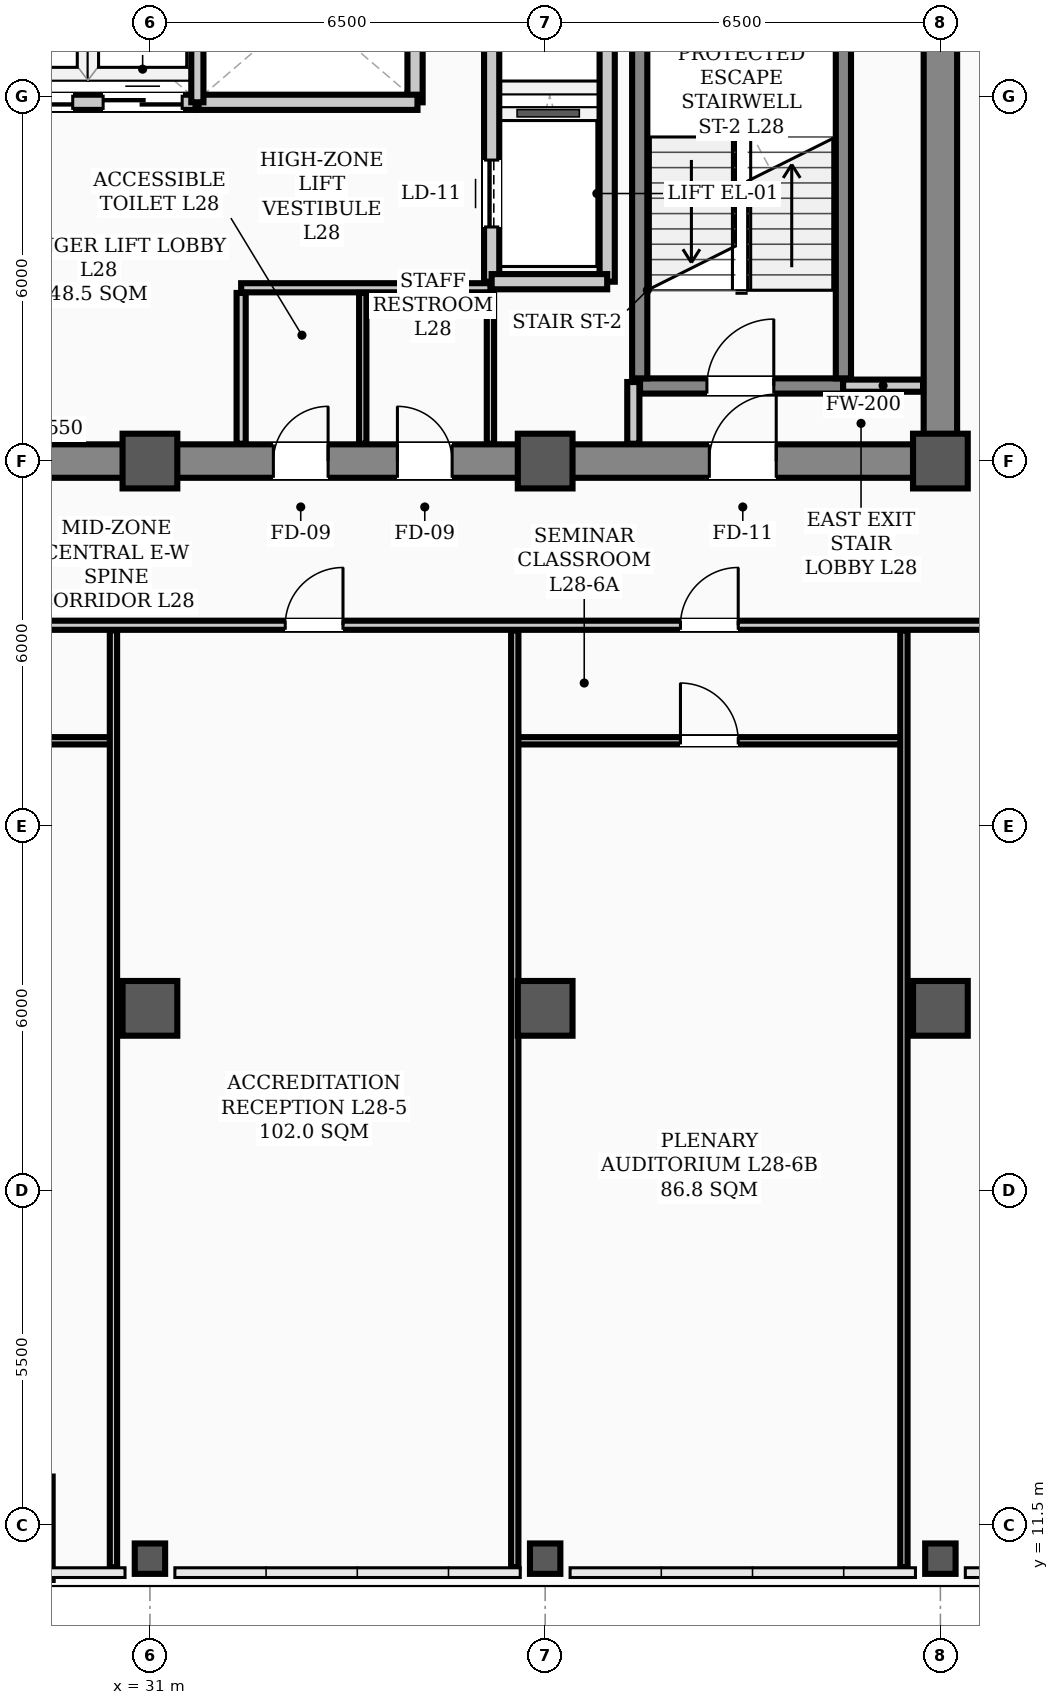
"""IFC4 building model, lengths in metres.
Left out: names, types, materials, properties, quantities, classifications, styles, units other than length and angle.
Written with IfcOpenShell. Run it as: python <this file> out.ifc"""

import sys

from ifc_helpers import new_model, si_unit, direction, frame, frame_2d, origin, origin_2d, place, context, subcontext, project, spatial, rectangle, hollow_rectangle, extrude, element, fill, save


model = new_model("IFC4")
c1 = context("Model", 3, precision=1e-05, world=origin(), true_north=direction((0.0, 1.0)))
c2 = subcontext(c1, "Body", "Model", "MODEL_VIEW")
j1 = project(units=[si_unit("LENGTHUNIT", "METRE"), si_unit("PLANEANGLEUNIT", "RADIAN")], contexts=[c1])
p1 = place(None, origin())
s1 = spatial("IfcSite", under=j1, at=p1, CompositionType="ELEMENT")
p2 = place(p1, origin())
s2 = spatial("IfcBuilding", under=s1, at=p2, CompositionType="ELEMENT")
p3 = place(p2, frame((0.0, 0.0, 114.9)))
s3 = spatial("IfcBuildingStorey", under=s2, at=p3, CompositionType="ELEMENT", Elevation=114.9)
for number, where, z_axis, x_axis in (
    (1, (31.0, 29.0, 0.0), (0.0, 0.0, 1.0), (1.0, 0.0, 0.0)),
    (2, (37.5, 29.0, 0.0), (0.0, 0.0, 1.0), (1.0, 0.0, 0.0)),
    (3, (44.0, 29.0, 0.0), (0.0, 0.0, 1.0), (1.0, 0.0, 0.0)),
    (4, (31.0, 20.0, 0.0), (0.0, 0.0, 1.0), (1.0, 0.0, 0.0)),
    (5, (37.5, 20.0, 0.0), (0.0, 0.0, 1.0), (1.0, 0.0, 0.0)),
    (6, (44.0, 20.0, 0.0), (0.0, 0.0, 1.0), (1.0, 0.0, 0.0)),
):
    element("IfcColumn", number, at=place(p3, frame(where, z_axis=z_axis, x_axis=x_axis)), inside=s3, PredefinedType="COLUMN", context=c2, shape_type="SweptSolid", body=[
        extrude(hollow_rectangle(XDim=0.9, YDim=0.9, WallThickness=0.035, InnerFilletRadius=0.017, OuterFilletRadius=0.052, at=origin_2d()), origin(), (0.0, 0.0, 1.0), 3.9),
    ])
for number, where, z_axis, x_axis in (
    (7, (31.0, 10.95, 0.0), (0.0, 0.0, 1.0), (1.0, 0.0, 0.0)),
    (8, (37.5, 10.95, 0.0), (0.0, 0.0, 1.0), (1.0, 0.0, 0.0)),
    (9, (44.0, 10.95, 0.0), (0.0, 0.0, 1.0), (1.0, 0.0, 0.0)),
):
    element("IfcColumn", number, at=place(p3, frame(where, z_axis=z_axis, x_axis=x_axis)), inside=s3, PredefinedType="COLUMN", context=c2, shape_type="SweptSolid", body=[
        extrude(hollow_rectangle(XDim=0.5, YDim=0.5, WallThickness=0.024, InnerFilletRadius=0.012, OuterFilletRadius=0.036, at=origin_2d()), origin(), (0.0, 0.0, 1.0), 3.9),
    ])
p4 = place(p3, frame((29.3, 12.3, 0.0), z_axis=(0.0, 0.0, 1.0), x_axis=(0.0, -1.0, 0.0)))
e10 = element("IfcWall", 10, at=p4, inside=s3, PredefinedType="PARAPET", context=c2, shape_type="SweptSolid", body=[
    extrude(rectangle(XDim=1.7, YDim=0.2, at=frame_2d((0.85, 0.0))), origin(), (0.0, 0.0, 1.0), 1.2),
])
p5 = place(p3, frame((13.5, 29.0, 0.0), z_axis=(0.0, 0.0, 1.0), x_axis=(1.0, 0.0, 0.0)))
e11 = element("IfcWall", 11, at=p5, inside=s3, PredefinedType="SHEAR", context=c2, shape_type="SweptSolid", body=[
    extrude(rectangle(XDim=30.5, YDim=0.55, at=frame_2d((15.25, 0.0))), origin(), (0.0, 0.0, 1.0), 3.72),
])
p6 = place(p5, frame((1.75, 0.0, 0.0)))
e12 = element("IfcOpeningElement", 12, at=p6, cuts=e11, PredefinedType="OPENING", context=c2, shape_type="SweptSolid", body=[
    extrude(rectangle(XDim=1.1, YDim=2.08, at=frame_2d((0.55, 1.04))), frame((0.0, 0.285, 0.0), z_axis=(0.0, -1.0, 0.0), x_axis=(1.0, 0.0, 0.0)), (0.0, 0.0, 1.0), 0.57),
])
p7 = place(p5, frame((26.7, 0.0, 0.0)))
e13 = element("IfcOpeningElement", 13, at=p7, cuts=e11, PredefinedType="OPENING", context=c2, shape_type="SweptSolid", body=[
    extrude(rectangle(XDim=1.1, YDim=2.08, at=frame_2d((0.55, 1.04))), frame((0.0, 0.285, 0.0), z_axis=(0.0, -1.0, 0.0), x_axis=(1.0, 0.0, 0.0)), (0.0, 0.0, 1.0), 0.57),
])
p8 = place(p5, frame((6.8, 0.0, 0.0)))
e14 = element("IfcOpeningElement", 14, at=p8, cuts=e11, PredefinedType="OPENING", context=c2, shape_type="SweptSolid", body=[
    extrude(rectangle(XDim=1.1, YDim=2.08, at=frame_2d((0.55, 1.04))), frame((0.0, 0.285, 0.0), z_axis=(0.0, -1.0, 0.0), x_axis=(1.0, 0.0, 0.0)), (0.0, 0.0, 1.0), 0.57),
])
p9 = place(p5, frame((13.2, 0.0, 0.0)))
e15 = element("IfcOpeningElement", 15, at=p9, cuts=e11, PredefinedType="OPENING", context=c2, shape_type="SweptSolid", body=[
    extrude(rectangle(XDim=1.6, YDim=2.08, at=frame_2d((0.8, 1.04))), frame((0.0, 0.285, 0.0), z_axis=(0.0, -1.0, 0.0), x_axis=(1.0, 0.0, 0.0)), (0.0, 0.0, 1.0), 0.57),
])
p10 = place(p5, frame((19.53, 0.0, 0.0)))
e16 = element("IfcOpeningElement", 16, at=p10, cuts=e11, PredefinedType="OPENING", context=c2, shape_type="SweptSolid", body=[
    extrude(rectangle(XDim=0.9, YDim=2.08, at=frame_2d((0.45, 1.04))), frame((0.0, 0.285, 0.0), z_axis=(0.0, -1.0, 0.0), x_axis=(1.0, 0.0, 0.0)), (0.0, 0.0, 1.0), 0.57),
])
p11 = place(p5, frame((21.57, 0.0, 0.0)))
e17 = element("IfcOpeningElement", 17, at=p11, cuts=e11, PredefinedType="OPENING", context=c2, shape_type="SweptSolid", body=[
    extrude(rectangle(XDim=0.9, YDim=2.08, at=frame_2d((0.45, 1.04))), frame((0.0, 0.285, 0.0), z_axis=(0.0, -1.0, 0.0), x_axis=(1.0, 0.0, 0.0)), (0.0, 0.0, 1.0), 0.57),
])
p12 = place(p3, frame((44.0, 29.35, 0.0), z_axis=(0.0, 0.0, 1.0), x_axis=(0.0, 1.0, 0.0)))
e18 = element("IfcWall", 18, at=p12, inside=s3, PredefinedType="SHEAR", context=c2, shape_type="SweptSolid", body=[
    extrude(rectangle(XDim=8.6, YDim=0.55, at=frame_2d((4.3, 0.0))), origin(), (0.0, 0.0, 1.0), 3.72),
])
p13 = place(p3, frame((39.06, 30.235, 0.0), z_axis=(0.0, 0.0, 1.0), x_axis=(1.0, 0.0, 0.0)))
e19 = element("IfcWall", 19, at=p13, inside=s3, PredefinedType="STANDARD", context=c2, shape_type="SweptSolid", body=[
    extrude(rectangle(XDim=3.34, YDim=0.25, at=frame_2d((1.67, 0.0))), origin(), (0.0, 0.0, 1.0), 3.72),
])
p14 = place(p13, frame((1.1, 0.0, 0.0)))
e20 = element("IfcOpeningElement", 20, at=p14, cuts=e19, PredefinedType="OPENING", context=c2, shape_type="SweptSolid", body=[
    extrude(rectangle(XDim=1.1, YDim=2.08, at=frame_2d((0.55, 1.04))), frame((0.0, 0.135, 0.0), z_axis=(0.0, -1.0, 0.0), x_axis=(1.0, 0.0, 0.0)), (0.0, 0.0, 1.0), 0.27),
])
for number, where, z_axis, x_axis in (
    (21, (39.055, 30.36, 0.0), (0.0, 0.0, 1.0), (0.0, 1.0, 0.0)),
    (22, (42.405, 30.36, 0.0), (0.0, 0.0, 1.0), (0.0, 1.0, 0.0)),
):
    element("IfcWall", number, at=place(p3, frame(where, z_axis=z_axis, x_axis=x_axis)), inside=s3, PredefinedType="STANDARD", context=c2, shape_type="SweptSolid", body=[
        extrude(rectangle(XDim=7.184, YDim=0.25, at=frame_2d((3.592, 0.0))), origin(), (0.0, 0.0, 1.0), 3.72),
    ])
p15 = place(p3, frame((36.62, 31.95, 0.0), z_axis=(0.0, 0.0, 1.0), x_axis=(0.0, 1.0, 0.0)))
e23 = element("IfcWall", 23, at=p15, inside=s3, PredefinedType="STANDARD", context=c2, shape_type="SweptSolid", body=[
    extrude(rectangle(XDim=6.0, YDim=0.25, at=frame_2d((3.0, 0.0))), origin(), (0.0, 0.0, 1.0), 3.72),
])
p16 = place(p15, frame((0.9, 0.0, 0.0)))
e24 = element("IfcOpeningElement", 24, at=p16, cuts=e23, PredefinedType="OPENING", context=c2, shape_type="SweptSolid", body=[
    extrude(rectangle(XDim=1.1, YDim=2.08, at=frame_2d((0.55, 1.04))), frame((0.0, 0.135, 0.0), z_axis=(0.0, -1.0, 0.0), x_axis=(1.0, 0.0, 0.0)), (0.0, 0.0, 1.0), 0.27),
])
p17 = place(p15, frame((4.0, 0.0, 0.0)))
e25 = element("IfcOpeningElement", 25, at=p17, cuts=e23, PredefinedType="OPENING", context=c2, shape_type="SweptSolid", body=[
    extrude(rectangle(XDim=1.1, YDim=2.08, at=frame_2d((0.55, 1.04))), frame((0.0, 0.135, 0.0), z_axis=(0.0, -1.0, 0.0), x_axis=(1.0, 0.0, 0.0)), (0.0, 0.0, 1.0), 0.27),
])
p18 = place(p3, frame((38.52, 31.95, 0.0), z_axis=(0.0, 0.0, 1.0), x_axis=(0.0, 1.0, 0.0)))
e26 = element("IfcWall", 26, at=p18, inside=s3, PredefinedType="STANDARD", context=c2, shape_type="SweptSolid", body=[
    extrude(rectangle(XDim=6.0, YDim=0.25, at=frame_2d((3.0, 0.0))), origin(), (0.0, 0.0, 1.0), 3.48),
])
p19 = place(p3, frame((36.62, 31.95, 0.0), z_axis=(0.0, 0.0, 1.0), x_axis=(1.0, 0.0, 0.0)))
e27 = element("IfcWall", 27, at=p19, inside=s3, PredefinedType="STANDARD", context=c2, shape_type="SweptSolid", body=[
    extrude(rectangle(XDim=1.9, YDim=0.25, at=frame_2d((0.95, 0.0))), origin(), (0.0, 0.0, 1.0), 3.48),
])
p20 = place(p3, frame((35.36, 34.9, 0.0), z_axis=(0.0, 0.0, 1.0), x_axis=(0.0, 1.0, 0.0)))
e28 = element("IfcWall", 28, at=p20, inside=s3, PredefinedType="STANDARD", context=c2, shape_type="SweptSolid", body=[
    extrude(rectangle(XDim=3.05, YDim=0.25, at=frame_2d((1.525, 0.0))), origin(), (0.0, 0.0, 1.0), 3.72),
])
p21 = place(p3, frame((28.2, 34.9, 0.0), z_axis=(0.0, 0.0, 1.0), x_axis=(1.0, 0.0, 0.0)))
e29 = element("IfcWall", 29, at=p21, inside=s3, PredefinedType="STANDARD", context=c2, shape_type="SweptSolid", body=[
    extrude(rectangle(XDim=3.55, YDim=0.25, at=frame_2d((1.775, 0.0))), origin(), (0.0, 0.0, 1.0), 3.72),
])
p22 = place(p21, frame((0.23, 0.0, 0.0)))
e30 = element("IfcOpeningElement", 30, at=p22, cuts=e29, PredefinedType="OPENING", context=c2, shape_type="SweptSolid", body=[
    extrude(rectangle(XDim=1.3, YDim=2.08, at=frame_2d((0.65, 1.04))), frame((0.0, 0.135, 0.0), z_axis=(0.0, -1.0, 0.0), x_axis=(1.0, 0.0, 0.0)), (0.0, 0.0, 1.0), 0.27),
])
p23 = place(p21, frame((2.03, 0.0, 0.0)))
e31 = element("IfcOpeningElement", 31, at=p23, cuts=e29, PredefinedType="OPENING", context=c2, shape_type="SweptSolid", body=[
    extrude(rectangle(XDim=1.3, YDim=2.08, at=frame_2d((0.65, 1.04))), frame((0.0, 0.135, 0.0), z_axis=(0.0, -1.0, 0.0), x_axis=(1.0, 0.0, 0.0)), (0.0, 0.0, 1.0), 0.27),
])
p24 = place(p3, frame((31.8, 34.9, 0.0), z_axis=(0.0, 0.0, 1.0), x_axis=(1.0, 0.0, 0.0)))
e32 = element("IfcWall", 32, at=p24, inside=s3, PredefinedType="STANDARD", context=c2, shape_type="SweptSolid", body=[
    extrude(rectangle(XDim=3.6, YDim=0.25, at=frame_2d((1.8, 0.0))), origin(), (0.0, 0.0, 1.0), 3.72),
])
p25 = place(p3, frame((42.4, 30.24, 0.0), z_axis=(0.0, 0.0, 1.0), x_axis=(1.0, 0.0, 0.0)))
e33 = element("IfcWall", 33, at=p25, inside=s3, PredefinedType="STANDARD", context=c2, shape_type="SweptSolid", body=[
    extrude(rectangle(XDim=1.315, YDim=0.2, at=frame_2d((0.658, 0.0))), origin(), (0.0, 0.0, 1.0), 3.1),
])
p26 = place(p3, frame((32.5, 31.85, 0.0), z_axis=(0.0, 0.0, 1.0), x_axis=(1.0, 0.0, 0.0)))
e34 = element("IfcWall", 34, at=p26, inside=s3, PredefinedType="PARTITIONING", context=c2, shape_type="SweptSolid", body=[
    extrude(rectangle(XDim=4.1, YDim=0.15, at=frame_2d((2.05, 0.0))), origin(), (0.0, 0.0, 1.0), 3.72),
])
p27 = place(p3, frame((2.31, 26.3, 0.0), z_axis=(0.0, 0.0, 1.0), x_axis=(1.0, 0.0, 0.0)))
e35 = element("IfcWall", 35, at=p27, inside=s3, PredefinedType="PARTITIONING", context=c2, shape_type="SweptSolid", body=[
    extrude(rectangle(XDim=46.38, YDim=0.15, at=frame_2d((23.19, 0.0))), origin(), (0.0, 0.0, 1.0), 3.1),
])
p28 = place(p27, frame((12.415, 0.0, 0.0)))
e36 = element("IfcOpeningElement", 36, at=p28, cuts=e35, PredefinedType="OPENING", context=c2, shape_type="SweptSolid", body=[
    extrude(rectangle(XDim=0.95, YDim=2.08, at=frame_2d((0.475, 1.04))), frame((0.0, 0.085, 0.0), z_axis=(0.0, -1.0, 0.0), x_axis=(1.0, 0.0, 0.0)), (0.0, 0.0, 1.0), 0.17),
])
p29 = place(p27, frame((17.815, 0.0, 0.0)))
e37 = element("IfcOpeningElement", 37, at=p29, cuts=e35, PredefinedType="OPENING", context=c2, shape_type="SweptSolid", body=[
    extrude(rectangle(XDim=0.95, YDim=2.08, at=frame_2d((0.475, 1.04))), frame((0.0, 0.085, 0.0), z_axis=(0.0, -1.0, 0.0), x_axis=(1.0, 0.0, 0.0)), (0.0, 0.0, 1.0), 0.17),
])
p30 = place(p27, frame((24.315, 0.0, 0.0)))
e38 = element("IfcOpeningElement", 38, at=p30, cuts=e35, PredefinedType="OPENING", context=c2, shape_type="SweptSolid", body=[
    extrude(rectangle(XDim=0.95, YDim=2.08, at=frame_2d((0.475, 1.04))), frame((0.0, 0.085, 0.0), z_axis=(0.0, -1.0, 0.0), x_axis=(1.0, 0.0, 0.0)), (0.0, 0.0, 1.0), 0.17),
])
p31 = place(p27, frame((30.915, 0.0, 0.0)))
e39 = element("IfcOpeningElement", 39, at=p31, cuts=e35, PredefinedType="OPENING", context=c2, shape_type="SweptSolid", body=[
    extrude(rectangle(XDim=0.95, YDim=2.08, at=frame_2d((0.475, 1.04))), frame((0.0, 0.085, 0.0), z_axis=(0.0, -1.0, 0.0), x_axis=(1.0, 0.0, 0.0)), (0.0, 0.0, 1.0), 0.17),
])
p32 = place(p27, frame((37.415, 0.0, 0.0)))
e40 = element("IfcOpeningElement", 40, at=p32, cuts=e35, PredefinedType="OPENING", context=c2, shape_type="SweptSolid", body=[
    extrude(rectangle(XDim=0.95, YDim=2.08, at=frame_2d((0.475, 1.04))), frame((0.0, 0.085, 0.0), z_axis=(0.0, -1.0, 0.0), x_axis=(1.0, 0.0, 0.0)), (0.0, 0.0, 1.0), 0.17),
])
p33 = place(p27, frame((43.26, 0.0, 0.0)))
e41 = element("IfcOpeningElement", 41, at=p33, cuts=e35, PredefinedType="OPENING", context=c2, shape_type="SweptSolid", body=[
    extrude(rectangle(XDim=0.95, YDim=2.08, at=frame_2d((0.475, 1.04))), frame((0.0, 0.085, 0.0), z_axis=(0.0, -1.0, 0.0), x_axis=(1.0, 0.0, 0.0)), (0.0, 0.0, 1.0), 0.17),
])
p34 = place(p3, frame((23.8, 24.4, 0.0), z_axis=(0.0, 0.0, 1.0), x_axis=(1.0, 0.0, 0.0)))
e42 = element("IfcWall", 42, at=p34, inside=s3, PredefinedType="PARTITIONING", context=c2, shape_type="SweptSolid", body=[
    extrude(rectangle(XDim=6.6, YDim=0.12, at=frame_2d((3.3, 0.0))), origin(), (0.0, 0.0, 1.0), 3.1),
])
p35 = place(p34, frame((2.825, 0.0, 0.0)))
e43 = element("IfcOpeningElement", 43, at=p35, cuts=e42, PredefinedType="OPENING", context=c2, shape_type="SweptSolid", body=[
    extrude(rectangle(XDim=0.95, YDim=2.08, at=frame_2d((0.475, 1.04))), frame((0.0, 0.07, 0.0), z_axis=(0.0, -1.0, 0.0), x_axis=(1.0, 0.0, 0.0)), (0.0, 0.0, 1.0), 0.14),
])
p36 = place(p3, frame((37.0, 24.4, 0.0), z_axis=(0.0, 0.0, 1.0), x_axis=(1.0, 0.0, 0.0)))
e44 = element("IfcWall", 44, at=p36, inside=s3, PredefinedType="PARTITIONING", context=c2, shape_type="SweptSolid", body=[
    extrude(rectangle(XDim=6.4, YDim=0.12, at=frame_2d((3.2, 0.0))), origin(), (0.0, 0.0, 1.0), 3.1),
])
p37 = place(p36, frame((2.725, 0.0, 0.0)))
e45 = element("IfcOpeningElement", 45, at=p37, cuts=e44, PredefinedType="OPENING", context=c2, shape_type="SweptSolid", body=[
    extrude(rectangle(XDim=0.95, YDim=2.08, at=frame_2d((0.475, 1.04))), frame((0.0, 0.07, 0.0), z_axis=(0.0, -1.0, 0.0), x_axis=(1.0, 0.0, 0.0)), (0.0, 0.0, 1.0), 0.14),
])
p38 = place(p3, frame((38.95, 29.285, 0.0), z_axis=(0.0, 0.0, 1.0), x_axis=(0.0, 1.0, 0.0)))
e46 = element("IfcWall", 46, at=p38, inside=s3, PredefinedType="STANDARD", context=c2, shape_type="SweptSolid", body=[
    extrude(rectangle(XDim=1.015, YDim=0.2, at=frame_2d((0.508, 0.0))), origin(), (0.0, 0.0, 1.0), 3.3),
])
p39 = place(p3, frame((32.5, 29.285, 0.0), z_axis=(0.0, 0.0, 1.0), x_axis=(0.0, 1.0, 0.0)))
e47 = element("IfcWall", 47, at=p39, inside=s3, PredefinedType="PARTITIONING", context=c2, shape_type="SweptSolid", body=[
    extrude(rectangle(XDim=2.48, YDim=0.15, at=frame_2d((1.24, 0.0))), origin(), (0.0, 0.0, 1.0), 3.3),
])
for number, where, z_axis, x_axis in (
    (48, (36.6, 29.285, 0.0), (0.0, 0.0, 1.0), (0.0, 1.0, 0.0)),
    (49, (34.5, 29.285, 0.0), (0.0, 0.0, 1.0), (0.0, 1.0, 0.0)),
):
    element("IfcWall", number, at=place(p3, frame(where, z_axis=z_axis, x_axis=x_axis)), inside=s3, PredefinedType="PARTITIONING", context=c2, shape_type="SweptSolid", body=[
        extrude(rectangle(XDim=2.48, YDim=0.12, at=frame_2d((1.24, 0.0))), origin(), (0.0, 0.0, 1.0), 3.3),
    ])
for number, where, z_axis, x_axis in (
    (50, (30.4, 10.81, 0.0), (0.0, 0.0, 1.0), (0.0, 1.0, 0.0)),
    (51, (37.0, 10.81, 0.0), (0.0, 0.0, 1.0), (0.0, 1.0, 0.0)),
    (52, (43.4, 10.81, 0.0), (0.0, 0.0, 1.0), (0.0, 1.0, 0.0)),
):
    element("IfcWall", number, at=place(p3, frame(where, z_axis=z_axis, x_axis=x_axis)), inside=s3, PredefinedType="PARTITIONING", context=c2, shape_type="SweptSolid", body=[
        extrude(rectangle(XDim=15.405, YDim=0.12, at=frame_2d((7.703, 0.0))), origin(), (0.0, 0.0, 1.0), 3.0),
    ])
p40 = place(p3, frame((31.78, 34.9, 0.0), z_axis=(0.0, 0.0, 1.0), x_axis=(0.0, 1.0, 0.0)))
e53 = element("IfcWall", 53, at=p40, inside=s3, PredefinedType="STANDARD", context=c2, shape_type="SweptSolid", body=[
    extrude(rectangle(XDim=3.12, YDim=0.2, at=frame_2d((1.56, 0.0))), origin(), (0.0, 0.0, 1.0), 3.72),
])
p41 = place(p14, origin())
e54 = element("IfcDoor", 54, at=p41, inside=s3, OperationType="SINGLE_SWING_RIGHT", PredefinedType="DOOR", context=c2, shape_type="SweptSolid", body=[
    extrude(rectangle(XDim=1.1, YDim=2.08, at=frame_2d((0.55, 1.04))), frame((0.0, 0.025, 0.0), z_axis=(0.0, -1.0, 0.0), x_axis=(1.0, 0.0, 0.0)), (0.0, 0.0, 1.0), 0.05),
])
fill(e20, e54)
p42 = place(p7, origin())
e55 = element("IfcDoor", 55, at=p42, inside=s3, OperationType="SINGLE_SWING_RIGHT", PredefinedType="DOOR", context=c2, shape_type="SweptSolid", body=[
    extrude(rectangle(XDim=1.1, YDim=2.08, at=frame_2d((0.55, 1.04))), frame((0.0, 0.025, 0.0), z_axis=(0.0, -1.0, 0.0), x_axis=(1.0, 0.0, 0.0)), (0.0, 0.0, 1.0), 0.05),
])
fill(e13, e55)
p43 = place(p10, origin())
e56 = element("IfcDoor", 56, at=p43, inside=s3, OperationType="SINGLE_SWING_RIGHT", PredefinedType="DOOR", context=c2, shape_type="SweptSolid", body=[
    extrude(rectangle(XDim=0.9, YDim=2.08, at=frame_2d((0.45, 1.04))), frame((0.0, 0.025, 0.0), z_axis=(0.0, -1.0, 0.0), x_axis=(1.0, 0.0, 0.0)), (0.0, 0.0, 1.0), 0.05),
])
fill(e16, e56)
p44 = place(p11, origin())
e57 = element("IfcDoor", 57, at=p44, inside=s3, OperationType="SINGLE_SWING_LEFT", PredefinedType="DOOR", context=c2, shape_type="SweptSolid", body=[
    extrude(rectangle(XDim=0.9, YDim=2.08, at=frame_2d((0.45, 1.04))), frame((0.0, 0.025, 0.0), z_axis=(0.0, -1.0, 0.0), x_axis=(1.0, 0.0, 0.0)), (0.0, 0.0, 1.0), 0.05),
])
fill(e17, e57)
p45 = place(p31, origin())
e58 = element("IfcDoor", 58, at=p45, inside=s3, OperationType="SINGLE_SWING_RIGHT", PredefinedType="DOOR", context=c2, shape_type="SweptSolid", body=[
    extrude(rectangle(XDim=0.95, YDim=2.08, at=frame_2d((0.475, 1.04))), frame((0.0, 0.025, 0.0), z_axis=(0.0, -1.0, 0.0), x_axis=(1.0, 0.0, 0.0)), (0.0, 0.0, 1.0), 0.05),
])
fill(e39, e58)
p46 = place(p37, origin())
e59 = element("IfcDoor", 59, at=p46, inside=s3, OperationType="SINGLE_SWING_LEFT", PredefinedType="DOOR", context=c2, shape_type="SweptSolid", body=[
    extrude(rectangle(XDim=0.95, YDim=2.08, at=frame_2d((0.475, 1.04))), frame((0.0, 0.025, 0.0), z_axis=(0.0, -1.0, 0.0), x_axis=(1.0, 0.0, 0.0)), (0.0, 0.0, 1.0), 0.05),
])
fill(e45, e59)
p47 = place(p32, origin())
e60 = element("IfcDoor", 60, at=p47, inside=s3, OperationType="SINGLE_SWING_RIGHT", PredefinedType="DOOR", context=c2, shape_type="SweptSolid", body=[
    extrude(rectangle(XDim=0.95, YDim=2.08, at=frame_2d((0.475, 1.04))), frame((0.0, 0.025, 0.0), z_axis=(0.0, -1.0, 0.0), x_axis=(1.0, 0.0, 0.0)), (0.0, 0.0, 1.0), 0.05),
])
fill(e40, e60)
p48 = place(p16, origin())
e61 = element("IfcDoor", 61, at=p48, inside=s3, OperationType="SLIDING_TO_LEFT", PredefinedType="DOOR", context=c2, shape_type="SweptSolid", body=[
    extrude(rectangle(XDim=1.1, YDim=2.08, at=frame_2d((0.55, 1.04))), frame((0.0, 0.025, 0.0), z_axis=(0.0, -1.0, 0.0), x_axis=(1.0, 0.0, 0.0)), (0.0, 0.0, 1.0), 0.05),
])
fill(e24, e61)
p49 = place(p22, origin())
e62 = element("IfcDoor", 62, at=p49, inside=s3, OperationType="DOUBLE_DOOR_SLIDING", PredefinedType="DOOR", context=c2, shape_type="SweptSolid", body=[
    extrude(rectangle(XDim=1.3, YDim=2.08, at=frame_2d((0.65, 1.04))), frame((0.0, 0.025, 0.0), z_axis=(0.0, -1.0, 0.0), x_axis=(1.0, 0.0, 0.0)), (0.0, 0.0, 1.0), 0.05),
])
fill(e30, e62)
p50 = place(p23, origin())
e63 = element("IfcDoor", 63, at=p50, inside=s3, OperationType="DOUBLE_DOOR_SLIDING", PredefinedType="DOOR", context=c2, shape_type="SweptSolid", body=[
    extrude(rectangle(XDim=1.3, YDim=2.08, at=frame_2d((0.65, 1.04))), frame((0.0, 0.025, 0.0), z_axis=(0.0, -1.0, 0.0), x_axis=(1.0, 0.0, 0.0)), (0.0, 0.0, 1.0), 0.05),
])
fill(e31, e63)
save(model, sys.argv[1])
